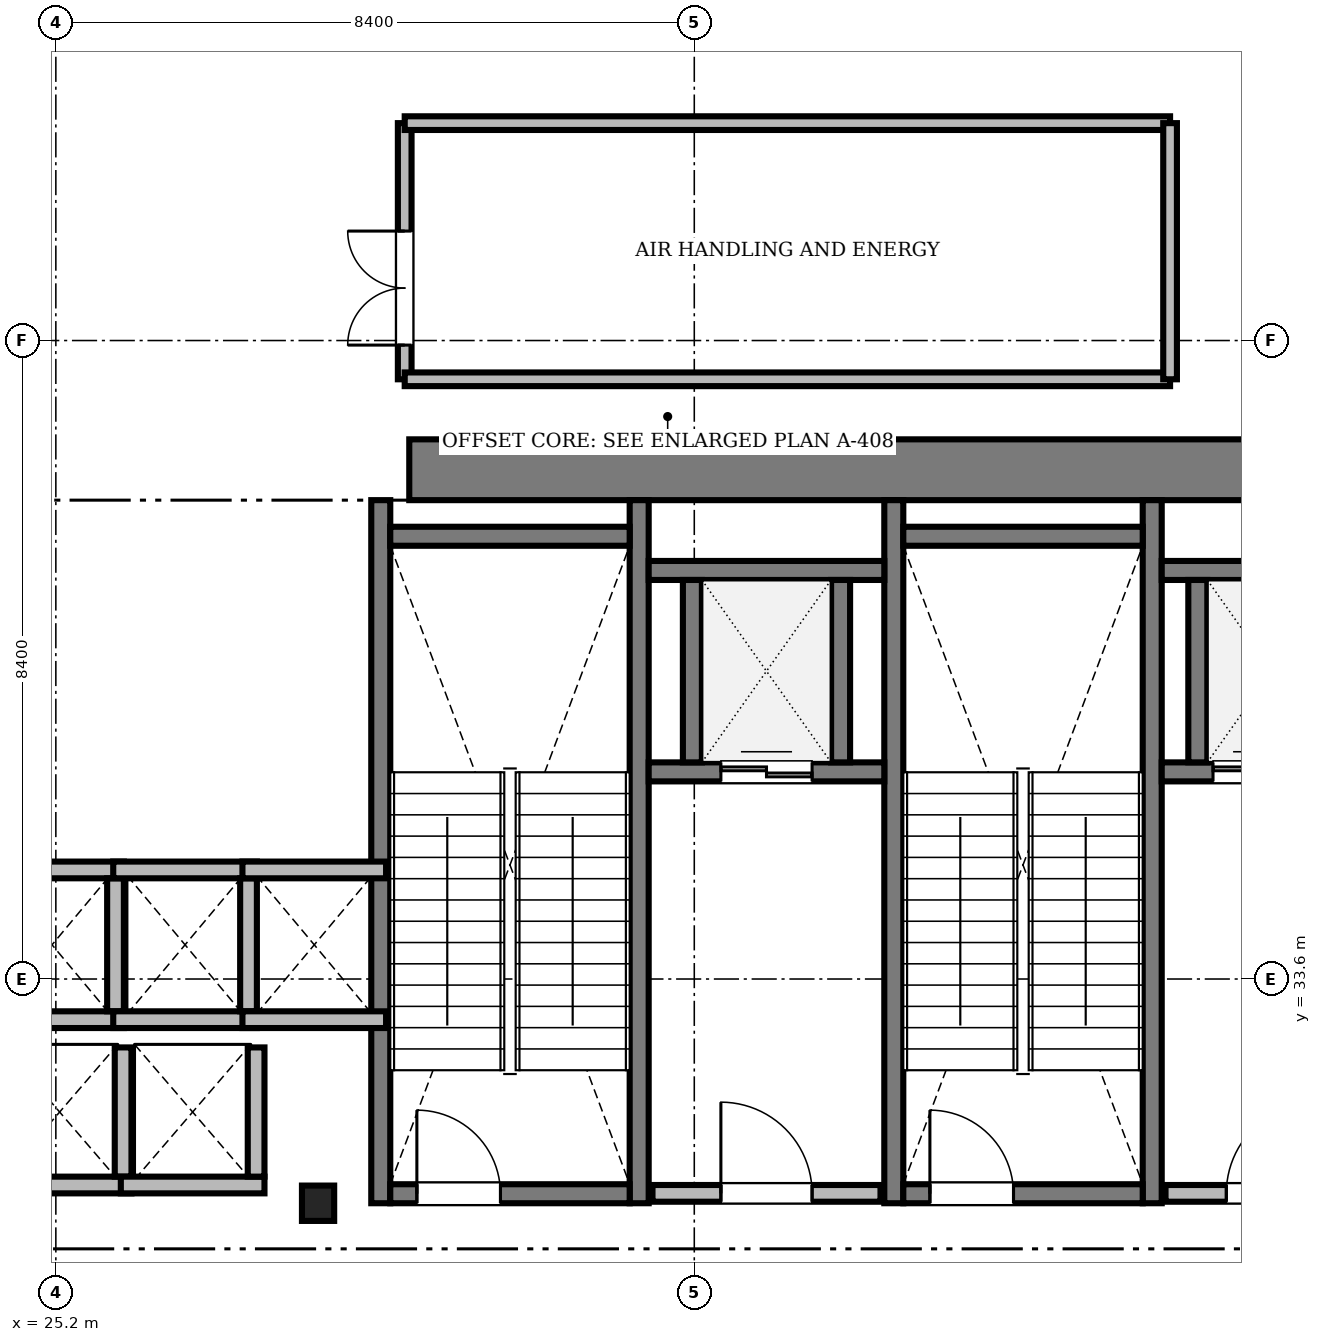
"""IFC4 building model, lengths in metres.
Left out: names, types, materials, properties, quantities, classifications, styles, units other than length and angle.
Written with IfcOpenShell. Run it as: python <this file> out.ifc"""

import sys

from ifc_helpers import new_model, si_unit, direction, frame, frame_2d, origin, origin_2d, place, context, subcontext, project, spatial, rectangle, i_section, extrude, source, transform, mapped, element, fill, save


model = new_model("IFC4")
c1 = context("Model", 3, precision=1e-05, world=origin(), true_north=direction((0.0, 1.0)))
c2 = subcontext(c1, "Body", "Model", "MODEL_VIEW")
j1 = project(units=[si_unit("LENGTHUNIT", "METRE"), si_unit("PLANEANGLEUNIT", "RADIAN")], contexts=[c1])
p1 = place(None, origin())
s1 = spatial("IfcSite", under=j1, at=p1, CompositionType="ELEMENT")
p2 = place(p1, origin())
s2 = spatial("IfcBuilding", under=s1, at=p2, CompositionType="ELEMENT")
p3 = place(p2, frame((0.0, 0.0, 166.8)))
s3 = spatial("IfcBuildingStorey", under=s2, at=p3, CompositionType="ELEMENT", Elevation=166.8)
m1 = source(origin(), c2, "Body", "SweptSolid", [
    extrude(rectangle(XDim=17.52, YDim=0.8, at=frame_2d((8.76, 0.0))), origin(), (0.0, 0.0, 1.0), 4.75),
])
p4 = place(p3, frame((29.85, 40.3, 0.0), z_axis=(0.0, 0.0, 1.0), x_axis=(1.0, 0.0, 0.0)))
e1 = element("IfcWall", 1, at=p4, inside=s3, PredefinedType="SHEAR", context=c2, shape_type="MappedRepresentation", body=[
    mapped(m1, transform((0.0, 0.0, 0.0), scale=1.0)),
])
m2 = source(origin(), c2, "Body", "SweptSolid", [
    extrude(i_section(OverallWidth=0.424, OverallDepth=0.465, WebThickness=0.035, FlangeThickness=0.056, FilletRadius=0.015, at=origin_2d()), origin(), (0.0, 0.0, 1.0), 4.75),
])
p5 = place(p3, frame((28.65, 30.65, 0.0), z_axis=(0.0, 0.0, 1.0), x_axis=(1.0, 0.0, 0.0)))
e2 = element("IfcColumn", 2, at=p5, inside=s3, PredefinedType="COLUMN", context=c2, shape_type="MappedRepresentation", body=[
    mapped(m2, transform((0.0, 0.0, 0.0), scale=1.0)),
])
m3 = source(origin(), c2, "Body", "SweptSolid", [
    extrude(rectangle(XDim=9.25, YDim=0.25, at=frame_2d((4.625, 0.0))), origin(), (0.0, 0.0, 1.0), 5.2),
])
for number, where, z_axis, x_axis in (
    (3, (29.475, 30.65, 0.0), (0.0, 0.0, 1.0), (0.0, 1.0, 0.0)),
    (4, (32.875, 30.65, 0.0), (0.0, 0.0, 1.0), (0.0, 1.0, 0.0)),
):
    element("IfcWall", number, at=place(p3, frame(where, z_axis=z_axis, x_axis=x_axis)), inside=s3, PredefinedType="SOLIDWALL", context=c2, shape_type="MappedRepresentation", body=[
        mapped(m3, transform((0.0, 0.0, 0.0), scale=1.0)),
    ])
m4 = source(origin(), c2, "Body", "SweptSolid", [
    extrude(rectangle(XDim=3.15, YDim=0.25, at=frame_2d((1.575, 0.0))), origin(), (0.0, 0.0, 1.0), 5.2),
])
p6 = place(p3, frame((29.6, 39.425, 0.0), z_axis=(0.0, 0.0, 1.0), x_axis=(1.0, 0.0, 0.0)))
e5 = element("IfcWall", 5, at=p6, inside=s3, PredefinedType="SOLIDWALL", context=c2, shape_type="MappedRepresentation", body=[
    mapped(m4, transform((0.0, 0.0, 0.0), scale=1.0)),
])
p7 = place(p3, frame((29.6, 30.775, 0.0), z_axis=(0.0, 0.0, 1.0), x_axis=(1.0, 0.0, 0.0)))
e6 = element("IfcWall", 6, at=p7, inside=s3, PredefinedType="SOLIDWALL", context=c2, shape_type="MappedRepresentation", body=[
    mapped(m4, transform((0.0, 0.0, 0.0), scale=1.0)),
])
m5 = source(origin(), c2, "Body", "SweptSolid", [
    extrude(rectangle(XDim=1.1, YDim=2.2, at=frame_2d((0.55, 1.1))), frame((0.0, 0.135, 0.0), z_axis=(0.0, -1.0, 0.0), x_axis=(1.0, 0.0, 0.0)), (0.0, 0.0, 1.0), 0.27),
])
p8 = place(p7, frame((0.35, 0.0, 0.0)))
e7 = element("IfcOpeningElement", 7, at=p8, cuts=e6, PredefinedType="OPENING", context=c2, shape_type="MappedRepresentation", body=[
    mapped(m5, transform((0.0, 0.0, 0.0), scale=1.0)),
])
for number, where, z_axis, x_axis in (
    (8, (36.225, 30.65, 0.0), (0.0, 0.0, 1.0), (0.0, 1.0, 0.0)),
    (9, (39.625, 30.65, 0.0), (0.0, 0.0, 1.0), (0.0, 1.0, 0.0)),
):
    element("IfcWall", number, at=place(p3, frame(where, z_axis=z_axis, x_axis=x_axis)), inside=s3, PredefinedType="SOLIDWALL", context=c2, shape_type="MappedRepresentation", body=[
        mapped(m3, transform((0.0, 0.0, 0.0), scale=1.0)),
    ])
p9 = place(p3, frame((36.35, 39.425, 0.0), z_axis=(0.0, 0.0, 1.0), x_axis=(1.0, 0.0, 0.0)))
e10 = element("IfcWall", 10, at=p9, inside=s3, PredefinedType="SOLIDWALL", context=c2, shape_type="MappedRepresentation", body=[
    mapped(m4, transform((0.0, 0.0, 0.0), scale=1.0)),
])
p10 = place(p3, frame((36.35, 30.775, 0.0), z_axis=(0.0, 0.0, 1.0), x_axis=(1.0, 0.0, 0.0)))
e11 = element("IfcWall", 11, at=p10, inside=s3, PredefinedType="SOLIDWALL", context=c2, shape_type="MappedRepresentation", body=[
    mapped(m4, transform((0.0, 0.0, 0.0), scale=1.0)),
])
p11 = place(p10, frame((0.35, 0.0, 0.0)))
e12 = element("IfcOpeningElement", 12, at=p11, cuts=e11, PredefinedType="OPENING", context=c2, shape_type="MappedRepresentation", body=[
    mapped(m5, transform((0.0, 0.0, 0.0), scale=1.0)),
])
m6 = source(origin(), c2, "Body", "SweptSolid", [
    extrude(rectangle(XDim=3.0, YDim=0.22, at=frame_2d((1.5, 0.0))), origin(), (0.0, 0.0, 1.0), 4.75),
])
p12 = place(p3, frame((33.05, 30.78, 0.0), z_axis=(0.0, 0.0, 1.0), x_axis=(1.0, 0.0, 0.0)))
e13 = element("IfcWall", 13, at=p12, inside=s3, PredefinedType="SOLIDWALL", context=c2, shape_type="MappedRepresentation", body=[
    mapped(m6, transform((0.0, 0.0, 0.0), scale=1.0)),
])
m7 = source(origin(), c2, "Body", "SweptSolid", [
    extrude(rectangle(XDim=1.2, YDim=2.2, at=frame_2d((0.6, 1.1))), frame((0.0, 0.12, 0.0), z_axis=(0.0, -1.0, 0.0), x_axis=(1.0, 0.0, 0.0)), (0.0, 0.0, 1.0), 0.24),
])
p13 = place(p12, frame((0.9, 0.0, 0.0)))
e14 = element("IfcOpeningElement", 14, at=p13, cuts=e13, PredefinedType="OPENING", context=c2, shape_type="MappedRepresentation", body=[
    mapped(m7, transform((0.0, 0.0, 0.0), scale=1.0)),
])
m8 = source(origin(), c2, "Body", "SweptSolid", [
    extrude(rectangle(XDim=2.8, YDim=0.22, at=frame_2d((1.4, 0.0))), origin(), (0.0, 0.0, 1.0), 4.75),
])
p14 = place(p3, frame((39.8, 30.78, 0.0), z_axis=(0.0, 0.0, 1.0), x_axis=(1.0, 0.0, 0.0)))
e15 = element("IfcWall", 15, at=p14, inside=s3, PredefinedType="SOLIDWALL", context=c2, shape_type="MappedRepresentation", body=[
    mapped(m8, transform((0.0, 0.0, 0.0), scale=1.0)),
])
p15 = place(p14, frame((0.8, 0.0, 0.0)))
e16 = element("IfcOpeningElement", 16, at=p15, cuts=e15, PredefinedType="OPENING", context=c2, shape_type="MappedRepresentation", body=[
    mapped(m7, transform((0.0, 0.0, 0.0), scale=1.0)),
])
m9 = source(origin(), c2, "Body", "SweptSolid", [
    extrude(rectangle(XDim=1.89, YDim=0.22, at=frame_2d((0.945, 0.0))), origin(), (0.0, 0.0, 1.0), 4.75),
])
for number, where, z_axis, x_axis in (
    (17, (24.205, 33.065, 0.0), (0.0, 0.0, 1.0), (1.0, 0.0, 0.0)),
    (18, (24.205, 35.035, 0.0), (0.0, 0.0, 1.0), (1.0, 0.0, 0.0)),
):
    element("IfcWall", number, at=place(p3, frame(where, z_axis=z_axis, x_axis=x_axis)), inside=s3, PredefinedType="SOLIDWALL", context=c2, shape_type="MappedRepresentation", body=[
        mapped(m9, transform((0.0, 0.0, 0.0), scale=1.0)),
    ])
m10 = source(origin(), c2, "Body", "SweptSolid", [
    extrude(rectangle(XDim=1.75, YDim=0.22, at=frame_2d((0.875, 0.0))), origin(), (0.0, 0.0, 1.0), 4.75),
])
p16 = place(p3, frame((25.985, 33.175, 0.0), z_axis=(0.0, 0.0, 1.0), x_axis=(0.0, 1.0, 0.0)))
e19 = element("IfcWall", 19, at=p16, inside=s3, PredefinedType="SOLIDWALL", context=c2, shape_type="MappedRepresentation", body=[
    mapped(m10, transform((0.0, 0.0, 0.0), scale=1.0)),
])
for number, where, z_axis, x_axis in (
    (20, (25.955, 33.065, 0.0), (0.0, 0.0, 1.0), (1.0, 0.0, 0.0)),
    (21, (25.955, 35.035, 0.0), (0.0, 0.0, 1.0), (1.0, 0.0, 0.0)),
):
    element("IfcWall", number, at=place(p3, frame(where, z_axis=z_axis, x_axis=x_axis)), inside=s3, PredefinedType="SOLIDWALL", context=c2, shape_type="MappedRepresentation", body=[
        mapped(m9, transform((0.0, 0.0, 0.0), scale=1.0)),
    ])
p17 = place(p3, frame((27.735, 33.175, 0.0), z_axis=(0.0, 0.0, 1.0), x_axis=(0.0, 1.0, 0.0)))
e22 = element("IfcWall", 22, at=p17, inside=s3, PredefinedType="SOLIDWALL", context=c2, shape_type="MappedRepresentation", body=[
    mapped(m10, transform((0.0, 0.0, 0.0), scale=1.0)),
])
for number, where, z_axis, x_axis in (
    (23, (27.655, 33.065, 0.0), (0.0, 0.0, 1.0), (1.0, 0.0, 0.0)),
    (24, (27.655, 35.035, 0.0), (0.0, 0.0, 1.0), (1.0, 0.0, 0.0)),
):
    element("IfcWall", number, at=place(p3, frame(where, z_axis=z_axis, x_axis=x_axis)), inside=s3, PredefinedType="SOLIDWALL", context=c2, shape_type="MappedRepresentation", body=[
        mapped(m9, transform((0.0, 0.0, 0.0), scale=1.0)),
    ])
m11 = source(origin(), c2, "Body", "SweptSolid", [
    extrude(rectangle(XDim=3.1, YDim=0.25, at=frame_2d((1.55, 0.0))), origin(), (0.0, 0.0, 1.0), 4.75),
])
p18 = place(p3, frame((33.0, 36.325, 0.0), z_axis=(0.0, 0.0, 1.0), x_axis=(1.0, 0.0, 0.0)))
e25 = element("IfcWall", 25, at=p18, inside=s3, PredefinedType="SOLIDWALL", context=c2, shape_type="MappedRepresentation", body=[
    mapped(m11, transform((0.0, 0.0, 0.0), scale=1.0)),
])
m12 = source(origin(), c2, "Body", "SweptSolid", [
    extrude(rectangle(XDim=1.2, YDim=2.25, at=frame_2d((0.6, 1.125))), frame((0.0, 0.135, 0.0), z_axis=(0.0, -1.0, 0.0), x_axis=(1.0, 0.0, 0.0)), (0.0, 0.0, 1.0), 0.27),
])
p19 = place(p18, frame((0.95, 0.0, 0.0)))
e26 = element("IfcOpeningElement", 26, at=p19, cuts=e25, PredefinedType="OPENING", context=c2, shape_type="MappedRepresentation", body=[
    mapped(m12, transform((0.0, 0.0, 0.0), scale=1.0)),
])
p20 = place(p3, frame((33.0, 38.975, 0.0), z_axis=(0.0, 0.0, 1.0), x_axis=(1.0, 0.0, 0.0)))
e27 = element("IfcWall", 27, at=p20, inside=s3, PredefinedType="SOLIDWALL", context=c2, shape_type="MappedRepresentation", body=[
    mapped(m11, transform((0.0, 0.0, 0.0), scale=1.0)),
])
m13 = source(origin(), c2, "Body", "SweptSolid", [
    extrude(rectangle(XDim=2.4, YDim=0.25, at=frame_2d((1.2, 0.0))), origin(), (0.0, 0.0, 1.0), 4.75),
])
for number, where, z_axis, x_axis in (
    (28, (33.575, 36.45, 0.0), (0.0, 0.0, 1.0), (0.0, 1.0, 0.0)),
    (29, (35.525, 36.45, 0.0), (0.0, 0.0, 1.0), (0.0, 1.0, 0.0)),
):
    element("IfcWall", number, at=place(p3, frame(where, z_axis=z_axis, x_axis=x_axis)), inside=s3, PredefinedType="SOLIDWALL", context=c2, shape_type="MappedRepresentation", body=[
        mapped(m13, transform((0.0, 0.0, 0.0), scale=1.0)),
    ])
m14 = source(origin(), c2, "Body", "SweptSolid", [
    extrude(rectangle(XDim=2.55, YDim=0.25, at=frame_2d((1.275, 0.0))), origin(), (0.0, 0.0, 1.0), 4.75),
])
p21 = place(p3, frame((39.75, 36.325, 0.0), z_axis=(0.0, 0.0, 1.0), x_axis=(1.0, 0.0, 0.0)))
e30 = element("IfcWall", 30, at=p21, inside=s3, PredefinedType="SOLIDWALL", context=c2, shape_type="MappedRepresentation", body=[
    mapped(m14, transform((0.0, 0.0, 0.0), scale=1.0)),
])
p22 = place(p21, frame((0.675, 0.0, 0.0)))
e31 = element("IfcOpeningElement", 31, at=p22, cuts=e30, PredefinedType="OPENING", context=c2, shape_type="MappedRepresentation", body=[
    mapped(m12, transform((0.0, 0.0, 0.0), scale=1.0)),
])
p23 = place(p3, frame((39.75, 38.975, 0.0), z_axis=(0.0, 0.0, 1.0), x_axis=(1.0, 0.0, 0.0)))
e32 = element("IfcWall", 32, at=p23, inside=s3, PredefinedType="SOLIDWALL", context=c2, shape_type="MappedRepresentation", body=[
    mapped(m14, transform((0.0, 0.0, 0.0), scale=1.0)),
])
p24 = place(p3, frame((40.225, 36.45, 0.0), z_axis=(0.0, 0.0, 1.0), x_axis=(0.0, 1.0, 0.0)))
e33 = element("IfcWall", 33, at=p24, inside=s3, PredefinedType="SOLIDWALL", context=c2, shape_type="MappedRepresentation", body=[
    mapped(m13, transform((0.0, 0.0, 0.0), scale=1.0)),
])
m15 = source(origin(), c2, "Body", "SweptSolid", [
    extrude(rectangle(XDim=1.89, YDim=0.22, at=frame_2d((0.945, 0.0))), origin(), (0.0, 0.0, 1.0), 4.75),
])
p25 = place(p3, frame((24.305, 30.89, 0.0), z_axis=(0.0, 0.0, 1.0), x_axis=(1.0, 0.0, 0.0)))
e34 = element("IfcWall", 34, at=p25, inside=s3, PredefinedType="SOLIDWALL", context=c2, shape_type="MappedRepresentation", body=[
    mapped(m15, transform((0.0, 0.0, 0.0), scale=1.0)),
])
m16 = source(origin(), c2, "Body", "SweptSolid", [
    extrude(rectangle(XDim=1.7, YDim=0.22, at=frame_2d((0.85, 0.0))), origin(), (0.0, 0.0, 1.0), 4.75),
])
p26 = place(p3, frame((26.085, 31.0, 0.0), z_axis=(0.0, 0.0, 1.0), x_axis=(0.0, 1.0, 0.0)))
e35 = element("IfcWall", 35, at=p26, inside=s3, PredefinedType="SOLIDWALL", context=c2, shape_type="MappedRepresentation", body=[
    mapped(m16, transform((0.0, 0.0, 0.0), scale=1.0)),
])
p27 = place(p3, frame((26.055, 30.89, 0.0), z_axis=(0.0, 0.0, 1.0), x_axis=(1.0, 0.0, 0.0)))
e36 = element("IfcWall", 36, at=p27, inside=s3, PredefinedType="SOLIDWALL", context=c2, shape_type="MappedRepresentation", body=[
    mapped(m15, transform((0.0, 0.0, 0.0), scale=1.0)),
])
p28 = place(p3, frame((27.835, 31.0, 0.0), z_axis=(0.0, 0.0, 1.0), x_axis=(0.0, 1.0, 0.0)))
e37 = element("IfcWall", 37, at=p28, inside=s3, PredefinedType="SOLIDWALL", context=c2, shape_type="MappedRepresentation", body=[
    mapped(m16, transform((0.0, 0.0, 0.0), scale=1.0)),
])
m17 = source(origin(), c2, "Body", "SweptSolid", [
    extrude(rectangle(XDim=3.37, YDim=0.18, at=frame_2d((1.685, 0.0))), origin(), (0.0, 0.0, 1.0), 4.75),
])
p29 = place(p3, frame((29.79, 41.49, 0.0), z_axis=(0.0, 0.0, 1.0), x_axis=(0.0, 1.0, 0.0)))
e38 = element("IfcWall", 38, at=p29, inside=s3, PredefinedType="PARTITIONING", context=c2, shape_type="MappedRepresentation", body=[
    mapped(m17, transform((0.0, 0.0, 0.0), scale=1.0)),
])
m18 = source(origin(), c2, "Body", "SweptSolid", [
    extrude(rectangle(XDim=1.5, YDim=2.3, at=frame_2d((0.75, 1.15))), frame((0.0, 0.1, 0.0), z_axis=(0.0, -1.0, 0.0), x_axis=(1.0, 0.0, 0.0)), (0.0, 0.0, 1.0), 0.2),
])
p30 = place(p29, frame((0.45, 0.0, 0.0)))
e39 = element("IfcOpeningElement", 39, at=p30, cuts=e38, PredefinedType="OPENING", context=c2, shape_type="MappedRepresentation", body=[
    mapped(m18, transform((0.0, 0.0, 0.0), scale=1.0)),
])
m19 = source(origin(), c2, "Body", "SweptSolid", [
    extrude(rectangle(XDim=10.07, YDim=0.18, at=frame_2d((5.035, 0.0))), origin(), (0.0, 0.0, 1.0), 4.75),
])
for number, where, z_axis, x_axis in (
    (40, (29.79, 41.49, 0.0), (0.0, 0.0, 1.0), (1.0, 0.0, 0.0)),
    (41, (29.79, 44.86, 0.0), (0.0, 0.0, 1.0), (1.0, 0.0, 0.0)),
):
    element("IfcWall", number, at=place(p3, frame(where, z_axis=z_axis, x_axis=x_axis)), inside=s3, PredefinedType="PARTITIONING", context=c2, shape_type="MappedRepresentation", body=[
        mapped(m19, transform((0.0, 0.0, 0.0), scale=1.0)),
    ])
p31 = place(p3, frame((39.86, 41.49, 0.0), z_axis=(0.0, 0.0, 1.0), x_axis=(0.0, 1.0, 0.0)))
e42 = element("IfcWall", 42, at=p31, inside=s3, PredefinedType="PARTITIONING", context=c2, shape_type="MappedRepresentation", body=[
    mapped(m17, transform((0.0, 0.0, 0.0), scale=1.0)),
])
m20 = source(origin(), c2, "Body", "SweptSolid", [
    extrude(rectangle(XDim=1.1, YDim=2.2, at=frame_2d((0.55, 1.1))), frame((0.0, 0.025, 0.0), z_axis=(0.0, -1.0, 0.0), x_axis=(1.0, 0.0, 0.0)), (0.0, 0.0, 1.0), 0.05),
])
p32 = place(p8, origin())
e43 = element("IfcDoor", 43, at=p32, inside=s3, OperationType="SINGLE_SWING_LEFT", PredefinedType="DOOR", context=c2, shape_type="MappedRepresentation", body=[
    mapped(m20, transform((0.0, 0.0, 0.0), scale=1.0)),
])
fill(e7, e43)
p33 = place(p11, origin())
e44 = element("IfcDoor", 44, at=p33, inside=s3, OperationType="SINGLE_SWING_LEFT", PredefinedType="DOOR", context=c2, shape_type="MappedRepresentation", body=[
    mapped(m20, transform((0.0, 0.0, 0.0), scale=1.0)),
])
fill(e12, e44)
m21 = source(origin(), c2, "Body", "SweptSolid", [
    extrude(rectangle(XDim=1.2, YDim=2.2, at=frame_2d((0.6, 1.1))), frame((0.0, 0.025, 0.0), z_axis=(0.0, -1.0, 0.0), x_axis=(1.0, 0.0, 0.0)), (0.0, 0.0, 1.0), 0.05),
])
p34 = place(p13, origin())
e45 = element("IfcDoor", 45, at=p34, inside=s3, OperationType="SINGLE_SWING_LEFT", PredefinedType="DOOR", context=c2, shape_type="MappedRepresentation", body=[
    mapped(m21, transform((0.0, 0.0, 0.0), scale=1.0)),
])
fill(e14, e45)
p35 = place(p15, origin())
e46 = element("IfcDoor", 46, at=p35, inside=s3, OperationType="SINGLE_SWING_RIGHT", PredefinedType="DOOR", context=c2, shape_type="MappedRepresentation", body=[
    mapped(m21, transform((0.0, 0.0, 0.0), scale=1.0)),
])
fill(e16, e46)
m22 = source(origin(), c2, "Body", "SweptSolid", [
    extrude(rectangle(XDim=1.2, YDim=2.25, at=frame_2d((0.6, 1.125))), frame((0.0, 0.025, 0.0), z_axis=(0.0, -1.0, 0.0), x_axis=(1.0, 0.0, 0.0)), (0.0, 0.0, 1.0), 0.05),
])
p36 = place(p19, origin())
e47 = element("IfcDoor", 47, at=p36, inside=s3, OperationType="DOUBLE_DOOR_SLIDING", PredefinedType="DOOR", context=c2, shape_type="MappedRepresentation", body=[
    mapped(m22, transform((0.0, 0.0, 0.0), scale=1.0)),
])
fill(e26, e47)
p37 = place(p22, origin())
e48 = element("IfcDoor", 48, at=p37, inside=s3, OperationType="DOUBLE_DOOR_SLIDING", PredefinedType="DOOR", context=c2, shape_type="MappedRepresentation", body=[
    mapped(m22, transform((0.0, 0.0, 0.0), scale=1.0)),
])
fill(e31, e48)
m23 = source(origin(), c2, "Body", "SweptSolid", [
    extrude(rectangle(XDim=1.5, YDim=2.3, at=frame_2d((0.75, 1.15))), frame((0.0, 0.025, 0.0), z_axis=(0.0, -1.0, 0.0), x_axis=(1.0, 0.0, 0.0)), (0.0, 0.0, 1.0), 0.05),
])
p38 = place(p30, origin())
e49 = element("IfcDoor", 49, at=p38, inside=s3, OperationType="DOUBLE_DOOR_SINGLE_SWING", PredefinedType="DOOR", context=c2, shape_type="MappedRepresentation", body=[
    mapped(m23, transform((0.0, 0.0, 0.0), scale=1.0)),
])
fill(e39, e49)
save(model, sys.argv[1])
